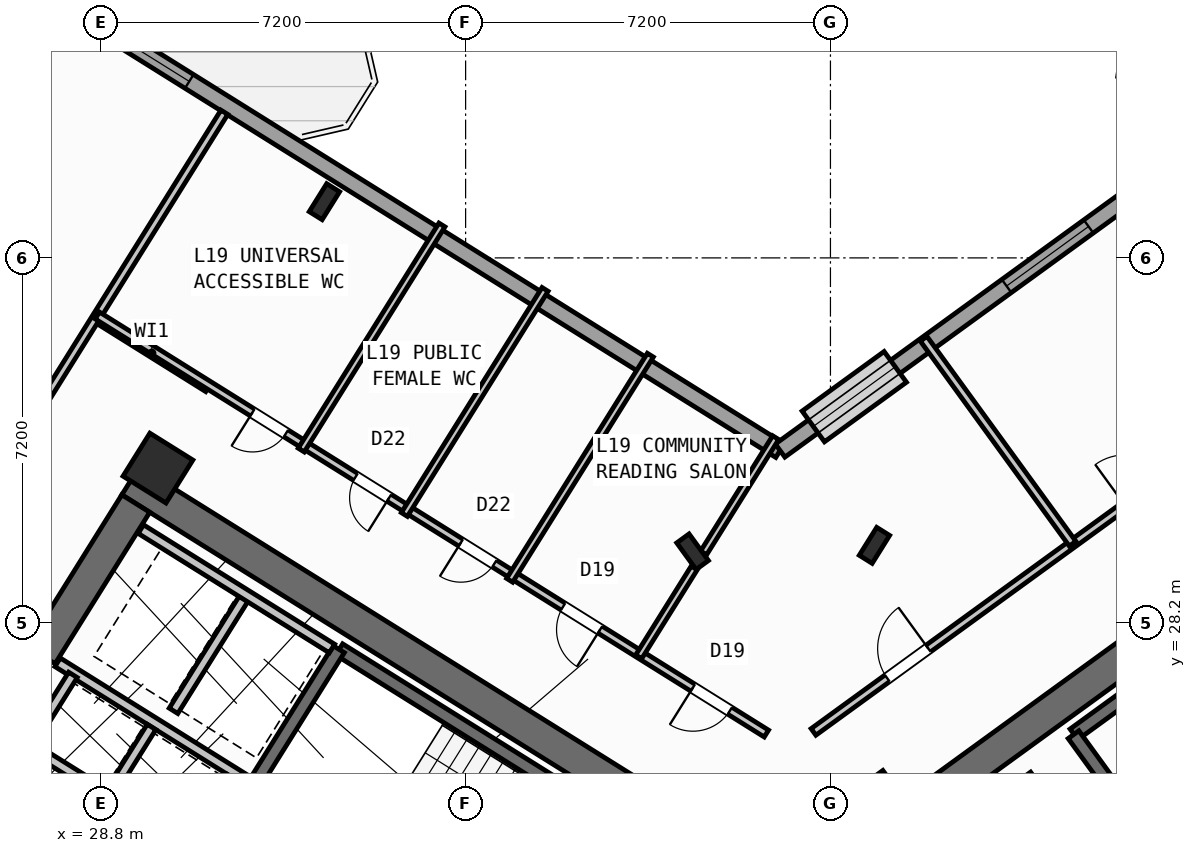
"""IFC4 building model, lengths in metres.
Left out: names, types, materials, properties, quantities, classifications, styles, units other than length and angle.
Written with IfcOpenShell. Run it as: python <this file> out.ifc"""

import sys

from ifc_helpers import new_model, si_unit, direction, frame, frame_2d, origin, origin_2d, place, context, subcontext, project, spatial, rectangle, hollow_rectangle, i_section, extrude, source, transform, mapped, element, fill, save


model = new_model("IFC4")
c1 = context("Model", 3, precision=1e-05, world=origin(), true_north=direction((0.0, 1.0)))
c2 = subcontext(c1, "Body", "Model", "MODEL_VIEW")
j1 = project(units=[si_unit("LENGTHUNIT", "METRE"), si_unit("PLANEANGLEUNIT", "RADIAN")], contexts=[c1])
p1 = place(None, origin())
s1 = spatial("IfcSite", under=j1, at=p1, CompositionType="ELEMENT")
p2 = place(p1, origin())
s2 = spatial("IfcBuilding", under=s1, at=p2, CompositionType="ELEMENT")
p3 = place(p2, frame((0.0, 0.0, 76.5)))
s3 = spatial("IfcBuildingStorey", under=s2, at=p3, CompositionType="ELEMENT", Elevation=76.5)
p4 = place(p3, frame((40.615, 23.983, 0.0), z_axis=(0.0, 0.0, 1.0), x_axis=(-0.848045953968, 0.529922692436, 0.0)))
e1 = element("IfcWall", 1, at=p4, inside=s3, PredefinedType="SHEAR", context=c2, shape_type="SweptSolid", body=[
    extrude(rectangle(XDim=13.24, YDim=0.65, at=frame_2d((6.62, 0.0))), origin(), (0.0, 0.0, 1.0), 4.25),
])
p5 = place(p3, frame((29.491, 30.552, 0.0), z_axis=(0.0, 0.0, 1.0), x_axis=(-0.529893103397, -0.8480644427, 0.0)))
e2 = element("IfcWall", 2, at=p5, inside=s3, PredefinedType="SHEAR", context=c2, shape_type="SweptSolid", body=[
    extrude(rectangle(XDim=3.525, YDim=0.65, at=frame_2d((1.763, 0.0))), origin(), (0.0, 0.0, 1.0), 4.25),
])
p6 = place(p3, frame((44.325, 24.113, 0.0), z_axis=(0.0, 0.0, 1.0), x_axis=(0.809012664862, 0.58779121131, 0.0)))
e3 = element("IfcWall", 3, at=p6, inside=s3, PredefinedType="SHEAR", context=c2, shape_type="SweptSolid", body=[
    extrude(rectangle(XDim=12.44, YDim=0.65, at=frame_2d((6.22, 0.0))), origin(), (0.0, 0.0, 1.0), 4.25),
])
m1 = source(origin(), c2, "Body", "SweptSolid", [
    extrude(i_section(OverallWidth=0.3, OverallDepth=0.65, WebThickness=0.016, FlangeThickness=0.031, at=origin_2d()), origin(), (0.0, 0.0, 1.0), 4.5),
])
for number, where, z_axis, x_axis in (
    (4, (44.068, 29.726, 0.0), (0.0, 0.0, 1.0), (-0.848, 0.53, 0.0)),
    (5, (33.213, 36.509, 0.0), (0.0, 0.0, 1.0), (-0.848, 0.53, 0.0)),
):
    element("IfcColumn", number, at=place(p3, frame(where, z_axis=z_axis, x_axis=x_axis)), inside=s3, PredefinedType="COLUMN", context=c2, shape_type="MappedRepresentation", body=[
        mapped(m1, transform((0.0, 0.0, 0.0), scale=1.0)),
    ])
m2 = source(origin(), c2, "Body", "SweptSolid", [
    extrude(hollow_rectangle(XDim=1.0, YDim=1.0, WallThickness=0.04, at=origin_2d()), origin(), (0.0, 0.0, 1.0), 4.5),
])
for number, where, z_axis, x_axis in (
    (6, (29.928, 31.251, 0.0), (0.0, 0.0, 1.0), (-0.848, 0.53, 0.0)),
    (7, (44.124, 24.585, 0.0), (0.0, 0.0, 1.0), (0.809, 0.588, 0.0)),
):
    element("IfcColumn", number, at=place(p3, frame(where, z_axis=z_axis, x_axis=x_axis)), inside=s3, PredefinedType="COLUMN", context=c2, shape_type="MappedRepresentation", body=[
        mapped(m2, transform((0.0, 0.0, 0.0), scale=1.0)),
    ])
p7 = place(p3, frame((40.479, 29.601, 0.0), z_axis=(0.0, 0.0, 1.0), x_axis=(0.809016994375, 0.587785252292, 0.0)))
e8 = element("IfcColumn", 8, at=p7, inside=s3, PredefinedType="COLUMN", context=c2, shape_type="MappedRepresentation", body=[
    mapped(m1, transform((0.0, 0.0, 0.0), scale=1.0)),
])
p8 = place(p3, frame((31.76, 12.183, 0.0), z_axis=(0.0, 0.0, 1.0), x_axis=(-0.848047074256, 0.529920899612, 0.0)))
e9 = element("IfcWall", 9, at=p8, inside=s3, PredefinedType="STANDARD", context=c2, shape_type="SweptSolid", body=[
    extrude(rectangle(XDim=30.652, YDim=0.32, at=frame_2d((15.326, 0.0))), origin(), (0.0, 0.0, 1.0), 4.25),
])
p9 = place(p8, frame((14.878, 0.0, 0.0)))
e10 = element("IfcOpeningElement", 10, at=p9, cuts=e9, PredefinedType="OPENING", context=c2, shape_type="SweptSolid", body=[
    extrude(rectangle(XDim=1.2, YDim=2.15, at=frame_2d((0.6, 1.075))), frame((0.0, 0.17, 0.0), z_axis=(0.0, -1.0, 0.0), x_axis=(1.0, 0.0, 0.0)), (0.0, 0.0, 1.0), 0.34),
])
p10 = place(p8, frame((1.74, 0.0, 0.7)))
e11 = element("IfcOpeningElement", 11, at=p10, cuts=e9, PredefinedType="OPENING", context=c2, shape_type="SweptSolid", body=[
    extrude(rectangle(XDim=2.6, YDim=2.0, at=frame_2d((1.3, 1.0))), frame((0.0, 0.17, 0.0), z_axis=(0.0, -1.0, 0.0), x_axis=(1.0, 0.0, 0.0)), (0.0, 0.0, 1.0), 0.34),
])
p11 = place(p8, frame((6.919, 0.0, 0.7)))
e12 = element("IfcOpeningElement", 12, at=p11, cuts=e9, PredefinedType="OPENING", context=c2, shape_type="SweptSolid", body=[
    extrude(rectangle(XDim=2.6, YDim=2.0, at=frame_2d((1.3, 1.0))), frame((0.0, 0.17, 0.0), z_axis=(0.0, -1.0, 0.0), x_axis=(1.0, 0.0, 0.0)), (0.0, 0.0, 1.0), 0.34),
])
p12 = place(p8, frame((19.451, 0.0, 0.85)))
e13 = element("IfcOpeningElement", 13, at=p12, cuts=e9, PredefinedType="OPENING", context=c2, shape_type="SweptSolid", body=[
    extrude(rectangle(XDim=1.6, YDim=1.8, at=frame_2d((0.8, 0.9))), frame((0.0, 0.17, 0.0), z_axis=(0.0, -1.0, 0.0), x_axis=(1.0, 0.0, 0.0)), (0.0, 0.0, 1.0), 0.34),
])
p13 = place(p8, frame((26.358, 0.0, 0.7)))
e14 = element("IfcOpeningElement", 14, at=p13, cuts=e9, PredefinedType="OPENING", context=c2, shape_type="SweptSolid", body=[
    extrude(rectangle(XDim=2.6, YDim=2.0, at=frame_2d((1.3, 1.0))), frame((0.0, 0.17, 0.0), z_axis=(0.0, -1.0, 0.0), x_axis=(1.0, 0.0, 0.0)), (0.0, 0.0, 1.0), 0.34),
])
p14 = place(p3, frame((17.424, 47.083, 0.0), z_axis=(0.0, 0.0, 1.0), x_axis=(0.848049927979, -0.529916332693, 0.0)))
e15 = element("IfcWall", 15, at=p14, inside=s3, PredefinedType="STANDARD", context=c2, shape_type="SweptSolid", body=[
    extrude(rectangle(XDim=29.223, YDim=0.32, at=frame_2d((14.612, 0.0))), origin(), (0.0, 0.0, 1.0), 4.25),
])
p15 = place(p14, frame((2.347, 0.0, 0.0)))
e16 = element("IfcOpeningElement", 16, at=p15, cuts=e15, PredefinedType="OPENING", context=c2, shape_type="SweptSolid", body=[
    extrude(rectangle(XDim=1.05, YDim=2.15, at=frame_2d((0.525, 1.075))), frame((0.0, 0.17, 0.0), z_axis=(0.0, -1.0, 0.0), x_axis=(1.0, 0.0, 0.0)), (0.0, 0.0, 1.0), 0.34),
])
p16 = place(p14, frame((9.276, 0.0, 0.7)))
e17 = element("IfcOpeningElement", 17, at=p16, cuts=e15, PredefinedType="OPENING", context=c2, shape_type="SweptSolid", body=[
    extrude(rectangle(XDim=2.6, YDim=2.0, at=frame_2d((1.3, 1.0))), frame((0.0, 0.17, 0.0), z_axis=(0.0, -1.0, 0.0), x_axis=(1.0, 0.0, 0.0)), (0.0, 0.0, 1.0), 0.34),
])
p17 = place(p14, frame((13.474, 0.0, 0.75)))
e18 = element("IfcOpeningElement", 18, at=p17, cuts=e15, PredefinedType="OPENING", context=c2, shape_type="SweptSolid", body=[
    extrude(rectangle(XDim=2.0, YDim=1.95, at=frame_2d((1.0, 0.975))), frame((0.0, 0.17, 0.0), z_axis=(0.0, -1.0, 0.0), x_axis=(1.0, 0.0, 0.0)), (0.0, 0.0, 1.0), 0.34),
])
p18 = place(p3, frame((42.207, 31.597, 0.0), z_axis=(0.0, 0.0, 1.0), x_axis=(0.809020333377, 0.587780656523, 0.0)))
e19 = element("IfcWall", 19, at=p18, inside=s3, PredefinedType="STANDARD", context=c2, shape_type="SweptSolid", body=[
    extrude(rectangle(XDim=15.223, YDim=0.32, at=frame_2d((7.611, 0.0))), origin(), (0.0, 0.0, 1.0), 4.25),
])
p19 = place(p18, frame((12.82, 0.0, 0.0)))
e20 = element("IfcOpeningElement", 20, at=p19, cuts=e19, PredefinedType="OPENING", context=c2, shape_type="SweptSolid", body=[
    extrude(rectangle(XDim=1.05, YDim=2.15, at=frame_2d((0.525, 1.075))), frame((0.0, 0.17, 0.0), z_axis=(0.0, -1.0, 0.0), x_axis=(1.0, 0.0, 0.0)), (0.0, 0.0, 1.0), 0.34),
])
p20 = place(p18, frame((0.81, 0.0, 0.75)))
e21 = element("IfcOpeningElement", 21, at=p20, cuts=e19, PredefinedType="OPENING", context=c2, shape_type="SweptSolid", body=[
    extrude(rectangle(XDim=2.0, YDim=1.95, at=frame_2d((1.0, 0.975))), frame((0.0, 0.17, 0.0), z_axis=(0.0, -1.0, 0.0), x_axis=(1.0, 0.0, 0.0)), (0.0, 0.0, 1.0), 0.34),
])
p21 = place(p18, frame((5.524, 0.0, 0.75)))
e22 = element("IfcOpeningElement", 22, at=p21, cuts=e19, PredefinedType="OPENING", context=c2, shape_type="SweptSolid", body=[
    extrude(rectangle(XDim=2.0, YDim=1.95, at=frame_2d((1.0, 0.975))), frame((0.0, 0.17, 0.0), z_axis=(0.0, -1.0, 0.0), x_axis=(1.0, 0.0, 0.0)), (0.0, 0.0, 1.0), 0.34),
])
p22 = place(p3, frame((39.721, 23.788, 0.0), z_axis=(0.0, 0.0, 1.0), x_axis=(-0.848054434086, 0.529909121291, 0.0)))
e23 = element("IfcWall", 23, at=p22, inside=s3, PredefinedType="SHEAR", context=c2, shape_type="SweptSolid", body=[
    extrude(rectangle(XDim=7.33, YDim=0.26, at=frame_2d((3.665, 0.0))), origin(), (0.0, 0.0, 1.0), 4.25),
])
p23 = place(p3, frame((33.496, 27.677, 0.0), z_axis=(0.0, 0.0, 1.0), x_axis=(-0.529908658664, -0.84805472316, 0.0)))
e24 = element("IfcWall", 24, at=p23, inside=s3, PredefinedType="SHEAR", context=c2, shape_type="SweptSolid", body=[
    extrude(rectangle(XDim=3.16, YDim=0.26, at=frame_2d((1.58, 0.0))), origin(), (0.0, 0.0, 1.0), 4.25),
])
p24 = place(p3, frame((31.822, 24.998, 0.0), z_axis=(0.0, 0.0, 1.0), x_axis=(-0.848058348634, 0.529902856485, 0.0)))
e25 = element("IfcWall", 25, at=p24, inside=s3, PredefinedType="STANDARD", context=c2, shape_type="SweptSolid", body=[
    extrude(rectangle(XDim=4.568, YDim=0.2, at=frame_2d((2.284, 0.0))), origin(), (0.0, 0.0, 1.0), 4.24),
])
p25 = place(p3, frame((32.108, 22.814, 0.0), z_axis=(0.0, 0.0, 1.0), x_axis=(-0.848042229521, 0.529928652696, 0.0)))
e26 = element("IfcWall", 26, at=p25, inside=s3, PredefinedType="STANDARD", context=c2, shape_type="SweptSolid", body=[
    extrude(rectangle(XDim=5.62, YDim=0.2, at=frame_2d((2.81, 0.0))), origin(), (0.0, 0.0, 1.0), 4.24),
])
p26 = place(p3, frame((28.25, 27.17, 0.0), z_axis=(0.0, 0.0, 1.0), x_axis=(-0.529905827651, -0.848056492117, 0.0)))
e27 = element("IfcWall", 27, at=p26, inside=s3, PredefinedType="STANDARD", context=c2, shape_type="SweptSolid", body=[
    extrude(rectangle(XDim=1.65, YDim=0.2, at=frame_2d((0.825, 0.0))), origin(), (0.0, 0.0, 1.0), 4.24),
])
p27 = place(p3, frame((31.645, 28.716, 0.0), z_axis=(0.0, 0.0, 1.0), x_axis=(-0.52986693015, -0.848080795876, 0.0)))
e28 = element("IfcWall", 28, at=p27, inside=s3, PredefinedType="STANDARD", context=c2, shape_type="SweptSolid", body=[
    extrude(rectangle(XDim=2.66, YDim=0.2, at=frame_2d((1.33, 0.0))), origin(), (0.0, 0.0, 1.0), 4.24),
])
p28 = place(p3, frame((33.363, 27.69, 0.0), z_axis=(0.0, 0.0, 1.0), x_axis=(-0.848053806312, 0.529910125964, 0.0)))
e29 = element("IfcWall", 29, at=p28, inside=s3, PredefinedType="STANDARD", context=c2, shape_type="SweptSolid", body=[
    extrude(rectangle(XDim=4.448, YDim=0.2, at=frame_2d((2.224, 0.0))), origin(), (0.0, 0.0, 1.0), 4.24),
])
p29 = place(p3, frame((29.801, 26.142, 0.0), z_axis=(0.0, 0.0, 1.0), x_axis=(-0.529998940003, -0.847998304005, 0.0)))
e30 = element("IfcWall", 30, at=p29, inside=s3, PredefinedType="STANDARD", context=c2, shape_type="SweptSolid", body=[
    extrude(rectangle(XDim=1.58, YDim=0.2, at=frame_2d((0.79, 0.0))), origin(), (0.0, 0.0, 1.0), 4.24),
])
p30 = place(p3, frame((48.006, 25.996, 0.0), z_axis=(0.0, 0.0, 1.0), x_axis=(0.80901903764, 0.587782439969, 0.0)))
e31 = element("IfcWall", 31, at=p30, inside=s3, PredefinedType="SHEAR", context=c2, shape_type="SweptSolid", body=[
    extrude(rectangle(XDim=7.46, YDim=0.26, at=frame_2d((3.73, 0.0))), origin(), (0.0, 0.0, 1.0), 4.25),
])
p31 = place(p3, frame((49.855, 23.434, 0.0), z_axis=(0.0, 0.0, 1.0), x_axis=(-0.58776738483, 0.809029975545, 0.0)))
e32 = element("IfcWall", 32, at=p31, inside=s3, PredefinedType="SHEAR", context=c2, shape_type="SweptSolid", body=[
    extrude(rectangle(XDim=3.16, YDim=0.26, at=frame_2d((1.58, 0.0))), origin(), (0.0, 0.0, 1.0), 4.25),
])
p32 = place(p3, frame((48.786, 22.83, 0.0), z_axis=(0.0, 0.0, 1.0), x_axis=(-0.587783856777, 0.809018008275, 0.0)))
e33 = element("IfcWall", 33, at=p32, inside=s3, PredefinedType="STANDARD", context=c2, shape_type="SweptSolid", body=[
    extrude(rectangle(XDim=2.92, YDim=0.2, at=frame_2d((1.46, 0.0))), origin(), (0.0, 0.0, 1.0), 4.24),
])
p33 = place(p3, frame((30.914, 32.829, 0.0), z_axis=(0.0, 0.0, 1.0), x_axis=(-0.848008813643, 0.529982124211, 0.0)))
e34 = element("IfcWall", 34, at=p33, inside=s3, PredefinedType="PARTITIONING", context=c2, shape_type="SweptSolid", body=[
    extrude(rectangle(XDim=2.61, YDim=0.16, at=frame_2d((1.305, 0.0))), origin(), (0.0, 0.0, 1.0), 4.24),
])
p34 = place(p3, frame((31.239, 38.274, 0.0), z_axis=(0.0, 0.0, 1.0), x_axis=(-0.529921796515, -0.848046513806, 0.0)))
e35 = element("IfcWall", 35, at=p34, inside=s3, PredefinedType="PARTITIONING", context=c2, shape_type="SweptSolid", body=[
    extrude(rectangle(XDim=16.5, YDim=0.16, at=frame_2d((8.25, 0.0))), origin(), (0.0, 0.0, 1.0), 4.24),
])
p35 = place(p3, frame((41.936, 26.012, 0.0), z_axis=(0.0, 0.0, 1.0), x_axis=(-0.848051154596, 0.529914369676, 0.0)))
e36 = element("IfcWall", 36, at=p35, inside=s3, PredefinedType="PARTITIONING", context=c2, shape_type="SweptSolid", body=[
    extrude(rectangle(XDim=15.57, YDim=0.16, at=frame_2d((7.785, 0.0))), origin(), (0.0, 0.0, 1.0), 4.24),
])
p36 = place(p35, frame((0.85, 0.0, 0.0)))
e37 = element("IfcOpeningElement", 37, at=p36, cuts=e36, PredefinedType="OPENING", context=c2, shape_type="SweptSolid", body=[
    extrude(rectangle(XDim=0.86, YDim=2.05, at=frame_2d((0.43, 1.025))), frame((0.0, 0.09, 0.0), z_axis=(0.0, -1.0, 0.0), x_axis=(1.0, 0.0, 0.0)), (0.0, 0.0, 1.0), 0.18),
])
p37 = place(p35, frame((3.87, 0.0, 0.0)))
e38 = element("IfcOpeningElement", 38, at=p37, cuts=e36, PredefinedType="OPENING", context=c2, shape_type="SweptSolid", body=[
    extrude(rectangle(XDim=0.86, YDim=2.05, at=frame_2d((0.43, 1.025))), frame((0.0, 0.09, 0.0), z_axis=(0.0, -1.0, 0.0), x_axis=(1.0, 0.0, 0.0)), (0.0, 0.0, 1.0), 0.18),
])
p38 = place(p35, frame((6.33, 0.0, 0.0)))
e39 = element("IfcOpeningElement", 39, at=p38, cuts=e36, PredefinedType="OPENING", context=c2, shape_type="SweptSolid", body=[
    extrude(rectangle(XDim=0.78, YDim=2.05, at=frame_2d((0.39, 1.025))), frame((0.0, 0.09, 0.0), z_axis=(0.0, -1.0, 0.0), x_axis=(1.0, 0.0, 0.0)), (0.0, 0.0, 1.0), 0.18),
])
p39 = place(p35, frame((8.78, 0.0, 0.0)))
e40 = element("IfcOpeningElement", 40, at=p39, cuts=e36, PredefinedType="OPENING", context=c2, shape_type="SweptSolid", body=[
    extrude(rectangle(XDim=0.78, YDim=2.05, at=frame_2d((0.39, 1.025))), frame((0.0, 0.09, 0.0), z_axis=(0.0, -1.0, 0.0), x_axis=(1.0, 0.0, 0.0)), (0.0, 0.0, 1.0), 0.18),
])
p40 = place(p35, frame((11.18, 0.0, 0.0)))
e41 = element("IfcOpeningElement", 41, at=p40, cuts=e36, PredefinedType="OPENING", context=c2, shape_type="SweptSolid", body=[
    extrude(rectangle(XDim=0.78, YDim=2.05, at=frame_2d((0.39, 1.025))), frame((0.0, 0.09, 0.0), z_axis=(0.0, -1.0, 0.0), x_axis=(1.0, 0.0, 0.0)), (0.0, 0.0, 1.0), 0.18),
])
p41 = place(p3, frame((42.119, 31.853, 0.0), z_axis=(0.0, 0.0, 1.0), x_axis=(-0.529933506458, -0.848039196461, 0.0)))
e42 = element("IfcWall", 42, at=p41, inside=s3, PredefinedType="PLUMBINGWALL", context=c2, shape_type="SweptSolid", body=[
    extrude(rectangle(XDim=2.683, YDim=0.14, at=frame_2d((1.342, 0.0))), origin(), (0.0, 0.0, 1.0), 3.735),
])
p42 = place(p3, frame((40.512, 29.281, 0.0), z_axis=(0.0, 0.0, 1.0), x_axis=(-0.529935255849, -0.848038103276, 0.0)))
e43 = element("IfcWall", 43, at=p42, inside=s3, PredefinedType="PLUMBINGWALL", context=c2, shape_type="SweptSolid", body=[
    extrude(rectangle(XDim=2.068, YDim=0.14, at=frame_2d((1.034, 0.0))), origin(), (0.0, 0.0, 1.0), 4.24),
])
for number, where, z_axis, x_axis in (
    (44, (39.646, 33.48, 0.0), (0.0, 0.0, 1.0), (-0.53, -0.848, 0.0)),
    (45, (37.568, 34.779, 0.0), (0.0, 0.0, 1.0), (-0.53, -0.848, 0.0)),
    (46, (35.533, 36.051, 0.0), (0.0, 0.0, 1.0), (-0.53, -0.848, 0.0)),
):
    element("IfcWall", number, at=place(p3, frame(where, z_axis=z_axis, x_axis=x_axis)), inside=s3, PredefinedType="PLUMBINGWALL", context=c2, shape_type="SweptSolid", body=[
        extrude(rectangle(XDim=5.24, YDim=0.14, at=frame_2d((2.62, 0.0))), origin(), (0.0, 0.0, 1.0), 4.24),
    ])
p43 = place(p3, frame((42.866, 26.044, 0.0), z_axis=(0.0, 0.0, 1.0), x_axis=(0.809020254154, 0.587780765566, 0.0)))
e47 = element("IfcWall", 47, at=p43, inside=s3, PredefinedType="PARTITIONING", context=c2, shape_type="SweptSolid", body=[
    extrude(rectangle(XDim=14.67, YDim=0.16, at=frame_2d((7.335, 0.0))), origin(), (0.0, 0.0, 1.0), 4.24),
])
p44 = place(p43, frame((1.8, 0.0, 0.0)))
e48 = element("IfcOpeningElement", 48, at=p44, cuts=e47, PredefinedType="OPENING", context=c2, shape_type="SweptSolid", body=[
    extrude(rectangle(XDim=1.0, YDim=2.1, at=frame_2d((0.5, 1.05))), frame((0.0, 0.09, 0.0), z_axis=(0.0, -1.0, 0.0), x_axis=(1.0, 0.0, 0.0)), (0.0, 0.0, 1.0), 0.18),
])
p45 = place(p43, frame((7.6, 0.0, 0.0)))
e49 = element("IfcOpeningElement", 49, at=p45, cuts=e47, PredefinedType="OPENING", context=c2, shape_type="SweptSolid", body=[
    extrude(rectangle(XDim=1.0, YDim=2.1, at=frame_2d((0.5, 1.05))), frame((0.0, 0.09, 0.0), z_axis=(0.0, -1.0, 0.0), x_axis=(1.0, 0.0, 0.0)), (0.0, 0.0, 1.0), 0.18),
])
p46 = place(p3, frame((47.979, 29.759, 0.0), z_axis=(0.0, 0.0, 1.0), x_axis=(-0.587782595105, 0.809018924928, 0.0)))
e50 = element("IfcWall", 50, at=p46, inside=s3, PredefinedType="PARTITIONING", context=c2, shape_type="SweptSolid", body=[
    extrude(rectangle(XDim=5.0, YDim=0.16, at=frame_2d((2.5, 0.0))), origin(), (0.0, 0.0, 1.0), 4.24),
])
m3 = source(origin(), c2, "Body", "SweptSolid", [
    extrude(rectangle(XDim=2.0, YDim=1.95, at=frame_2d((1.0, 0.975))), frame((0.0, 0.03, 0.0), z_axis=(0.0, -1.0, 0.0), x_axis=(1.0, 0.0, 0.0)), (0.0, 0.0, 1.0), 0.06),
])
p47 = place(p17, origin())
e51 = element("IfcWindow", 51, at=p47, inside=s3, PartitioningType="SINGLE_PANEL", PredefinedType="WINDOW", context=c2, shape_type="MappedRepresentation", body=[
    mapped(m3, transform((0.0, 0.0, 0.0), scale=1.0)),
])
fill(e18, e51)
p48 = place(p20, origin())
e52 = element("IfcWindow", 52, at=p48, inside=s3, PartitioningType="SINGLE_PANEL", PredefinedType="WINDOW", context=c2, shape_type="MappedRepresentation", body=[
    mapped(m3, transform((0.0, 0.0, 0.0), scale=1.0)),
])
fill(e21, e52)
p49 = place(p21, origin())
e53 = element("IfcWindow", 53, at=p49, inside=s3, PartitioningType="SINGLE_PANEL", PredefinedType="WINDOW", context=c2, shape_type="MappedRepresentation", body=[
    mapped(m3, transform((0.0, 0.0, 0.0), scale=1.0)),
])
fill(e22, e53)
m4 = source(origin(), c2, "Body", "SweptSolid", [
    extrude(rectangle(XDim=0.86, YDim=2.05, at=frame_2d((0.43, 1.025))), frame((0.0, 0.025, 0.0), z_axis=(0.0, -1.0, 0.0), x_axis=(1.0, 0.0, 0.0)), (0.0, 0.0, 1.0), 0.05),
])
p50 = place(p36, origin())
e54 = element("IfcDoor", 54, at=p50, inside=s3, OperationType="SINGLE_SWING_RIGHT", PredefinedType="DOOR", context=c2, shape_type="MappedRepresentation", body=[
    mapped(m4, transform((0.0, 0.0, 0.0), scale=1.0)),
])
fill(e37, e54)
p51 = place(p37, origin())
e55 = element("IfcDoor", 55, at=p51, inside=s3, OperationType="SINGLE_SWING_LEFT", PredefinedType="DOOR", context=c2, shape_type="MappedRepresentation", body=[
    mapped(m4, transform((0.0, 0.0, 0.0), scale=1.0)),
])
fill(e38, e55)
m5 = source(origin(), c2, "Body", "SweptSolid", [
    extrude(rectangle(XDim=0.78, YDim=2.05, at=frame_2d((0.39, 1.025))), frame((0.0, 0.025, 0.0), z_axis=(0.0, -1.0, 0.0), x_axis=(1.0, 0.0, 0.0)), (0.0, 0.0, 1.0), 0.05),
])
p52 = place(p38, origin())
e56 = element("IfcDoor", 56, at=p52, inside=s3, OperationType="SINGLE_SWING_RIGHT", PredefinedType="DOOR", context=c2, shape_type="MappedRepresentation", body=[
    mapped(m5, transform((0.0, 0.0, 0.0), scale=1.0)),
])
fill(e39, e56)
p53 = place(p39, origin())
e57 = element("IfcDoor", 57, at=p53, inside=s3, OperationType="SINGLE_SWING_LEFT", PredefinedType="DOOR", context=c2, shape_type="MappedRepresentation", body=[
    mapped(m5, transform((0.0, 0.0, 0.0), scale=1.0)),
])
fill(e40, e57)
p54 = place(p40, origin())
e58 = element("IfcDoor", 58, at=p54, inside=s3, OperationType="SINGLE_SWING_RIGHT", PredefinedType="DOOR", context=c2, shape_type="MappedRepresentation", body=[
    mapped(m5, transform((0.0, 0.0, 0.0), scale=1.0)),
])
fill(e41, e58)
m6 = source(origin(), c2, "Body", "SweptSolid", [
    extrude(rectangle(XDim=1.0, YDim=2.1, at=frame_2d((0.5, 1.05))), frame((0.0, 0.025, 0.0), z_axis=(0.0, -1.0, 0.0), x_axis=(1.0, 0.0, 0.0)), (0.0, 0.0, 1.0), 0.05),
])
p55 = place(p44, origin())
e59 = element("IfcDoor", 59, at=p55, inside=s3, OperationType="SINGLE_SWING_RIGHT", PredefinedType="DOOR", context=c2, shape_type="MappedRepresentation", body=[
    mapped(m6, transform((0.0, 0.0, 0.0), scale=1.0)),
])
fill(e48, e59)
save(model, sys.argv[1])
